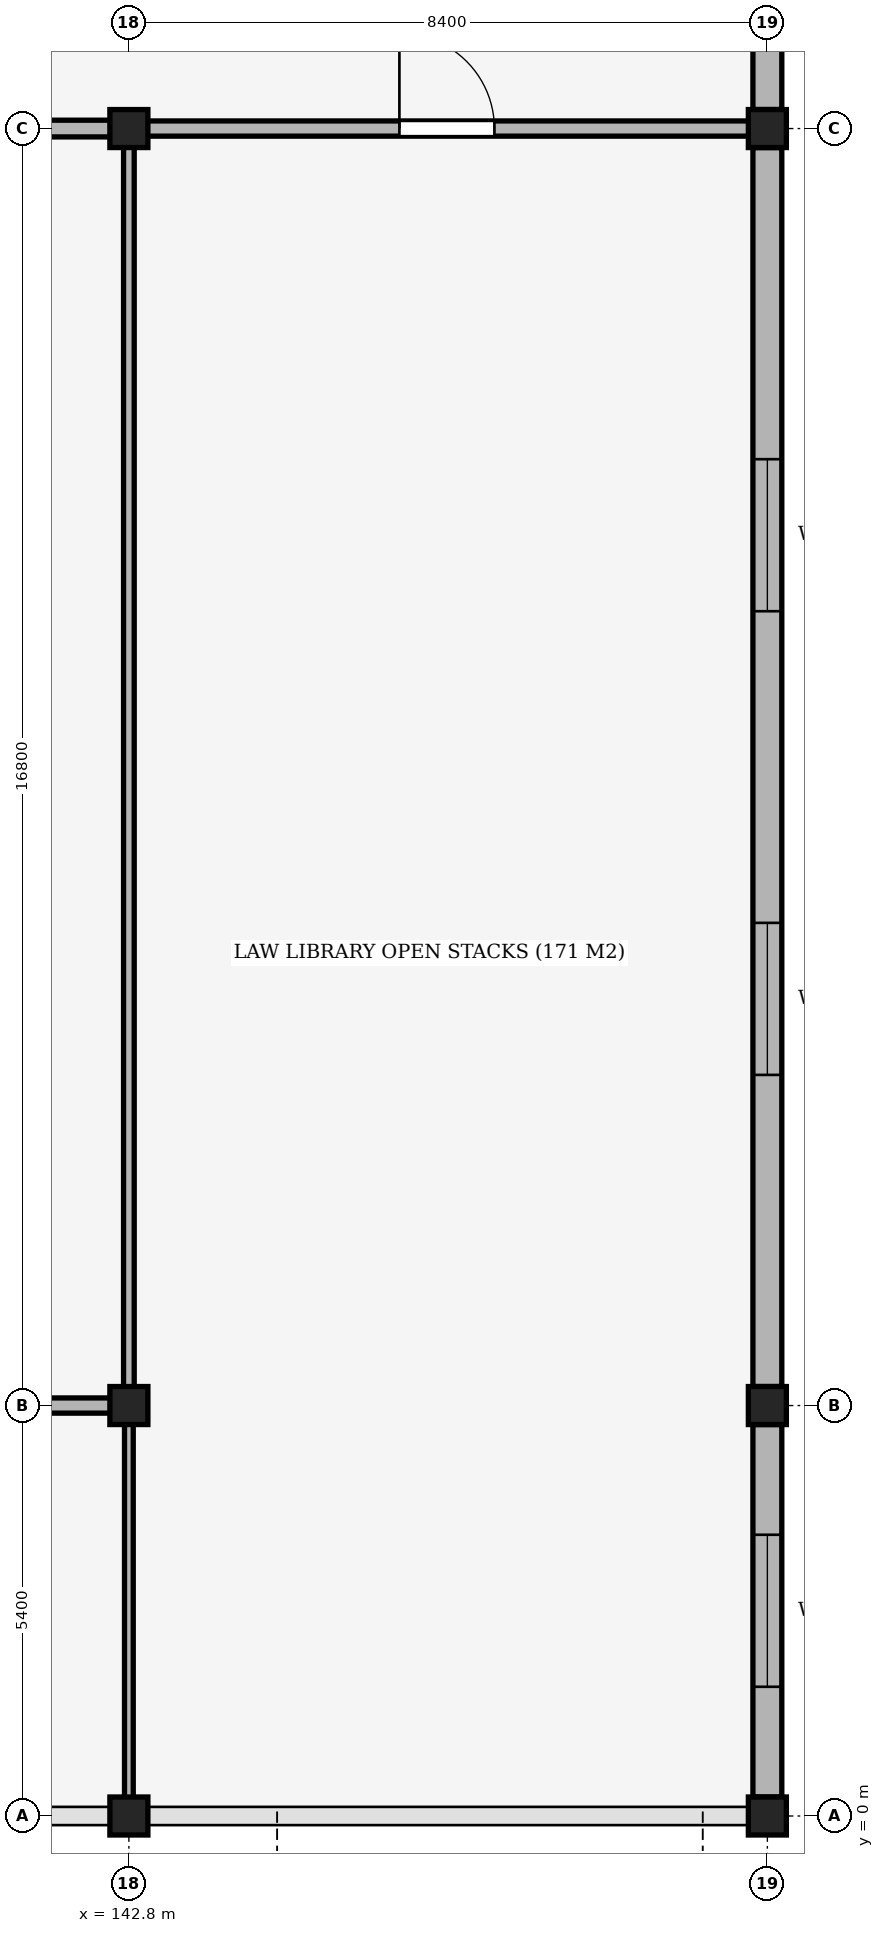
"""IFC4 building model, lengths in metres.
Left out: names, types, materials, properties, quantities, classifications, styles, units other than length and angle.
Written with IfcOpenShell. Run it as: python <this file> out.ifc"""

import sys

from ifc_helpers import new_model, si_unit, direction, frame, frame_2d, origin, origin_2d, place, context, subcontext, project, spatial, rectangle, extrude, element, fill, save


model = new_model("IFC4")
c1 = context("Model", 3, precision=1e-05, world=origin(), true_north=direction((0.0, 1.0)))
c2 = subcontext(c1, "Body", "Model", "MODEL_VIEW")
j1 = project(units=[si_unit("LENGTHUNIT", "METRE"), si_unit("PLANEANGLEUNIT", "RADIAN")], contexts=[c1])
p1 = place(None, origin())
s1 = spatial("IfcSite", under=j1, at=p1, CompositionType="ELEMENT")
p2 = place(p1, origin())
s2 = spatial("IfcBuilding", under=s1, at=p2, CompositionType="ELEMENT")
p3 = place(p2, frame((0.0, 0.0, 10.2)))
s3 = spatial("IfcBuildingStorey", under=s2, at=p3, CompositionType="ELEMENT", Elevation=10.2)
for number, where, z_axis, x_axis in (
    (1, (142.8, 0.0, 0.0), (0.0, 0.0, 1.0), (1.0, 0.0, 0.0)),
    (2, (142.8, 5.4, 0.0), (0.0, 0.0, 1.0), (1.0, 0.0, 0.0)),
    (3, (142.8, 22.2, 0.0), (0.0, 0.0, 1.0), (1.0, 0.0, 0.0)),
    (4, (151.2, 0.0, 0.0), (0.0, 0.0, 1.0), (1.0, 0.0, 0.0)),
    (5, (151.2, 5.4, 0.0), (0.0, 0.0, 1.0), (1.0, 0.0, 0.0)),
    (6, (151.2, 22.2, 0.0), (0.0, 0.0, 1.0), (1.0, 0.0, 0.0)),
):
    element("IfcColumn", number, at=place(p3, frame(where, z_axis=z_axis, x_axis=x_axis)), inside=s3, PredefinedType="COLUMN", context=c2, shape_type="SweptSolid", body=[
        extrude(rectangle(XDim=0.5, YDim=0.5, at=origin_2d()), origin(), (0.0, 0.0, 1.0), 5.1),
    ])
p4 = place(p3, frame((151.2, 26.75, 0.0), z_axis=(0.0, 0.0, 1.0), x_axis=(0.0, -1.0, 0.0)))
e7 = element("IfcWall", 7, at=p4, inside=s3, PredefinedType="SOLIDWALL", context=c2, shape_type="SweptSolid", body=[
    extrude(rectangle(XDim=4.3, YDim=0.38, at=frame_2d((2.15, 0.0))), origin(), (0.0, 0.0, 1.0), 3.77),
])
p5 = place(p3, frame((151.2, 21.95, 0.0), z_axis=(0.0, 0.0, 1.0), x_axis=(0.0, -1.0, 0.0)))
e8 = element("IfcWall", 8, at=p5, inside=s3, PredefinedType="SOLIDWALL", context=c2, shape_type="SweptSolid", body=[
    extrude(rectangle(XDim=16.3, YDim=0.38, at=frame_2d((8.15, 0.0))), origin(), (0.0, 0.0, 1.0), 3.77),
])
p6 = place(p5, frame((4.1, 0.0, 2.1)))
e9 = element("IfcOpeningElement", 9, at=p6, cuts=e8, PredefinedType="OPENING", context=c2, shape_type="SweptSolid", body=[
    extrude(rectangle(XDim=2.0, YDim=1.2, at=frame_2d((1.0, 0.6))), frame((0.0, 0.205, 0.0), z_axis=(0.0, -1.0, 0.0), x_axis=(1.0, 0.0, 0.0)), (0.0, 0.0, 1.0), 0.41),
])
p7 = place(p5, frame((10.2, 0.0, 2.1)))
e10 = element("IfcOpeningElement", 10, at=p7, cuts=e8, PredefinedType="OPENING", context=c2, shape_type="SweptSolid", body=[
    extrude(rectangle(XDim=2.0, YDim=1.2, at=frame_2d((1.0, 0.6))), frame((0.0, 0.205, 0.0), z_axis=(0.0, -1.0, 0.0), x_axis=(1.0, 0.0, 0.0)), (0.0, 0.0, 1.0), 0.41),
])
p8 = place(p3, frame((151.2, 5.15, 0.0), z_axis=(0.0, 0.0, 1.0), x_axis=(0.0, -1.0, 0.0)))
e11 = element("IfcWall", 11, at=p8, inside=s3, PredefinedType="SOLIDWALL", context=c2, shape_type="SweptSolid", body=[
    extrude(rectangle(XDim=4.9, YDim=0.38, at=frame_2d((2.45, 0.0))), origin(), (0.0, 0.0, 1.0), 3.77),
])
p9 = place(p8, frame((1.45, 0.0, 2.1)))
e12 = element("IfcOpeningElement", 12, at=p9, cuts=e11, PredefinedType="OPENING", context=c2, shape_type="SweptSolid", body=[
    extrude(rectangle(XDim=2.0, YDim=1.2, at=frame_2d((1.0, 0.6))), frame((0.0, 0.205, 0.0), z_axis=(0.0, -1.0, 0.0), x_axis=(1.0, 0.0, 0.0)), (0.0, 0.0, 1.0), 0.41),
])
p10 = place(p3, frame((117.6, 5.4, 0.0), z_axis=(0.0, 0.0, 1.0), x_axis=(1.0, 0.0, 0.0)))
e13 = element("IfcWall", 13, at=p10, inside=s3, PredefinedType="PARTITIONING", context=c2, shape_type="SweptSolid", body=[
    extrude(rectangle(XDim=25.2, YDim=0.2, at=frame_2d((12.6, 0.0))), origin(), (0.0, 0.0, 1.0), 3.77),
])
p11 = place(p10, frame((12.075, 0.0, 0.0)))
e14 = element("IfcOpeningElement", 14, at=p11, cuts=e13, PredefinedType="OPENING", context=c2, shape_type="SweptSolid", body=[
    extrude(rectangle(XDim=1.05, YDim=2.1, at=frame_2d((0.525, 1.05))), frame((0.0, 0.115, 0.0), z_axis=(0.0, -1.0, 0.0), x_axis=(1.0, 0.0, 0.0)), (0.0, 0.0, 1.0), 0.23),
])
p12 = place(p3, frame((117.6, 22.2, 0.0), z_axis=(0.0, 0.0, 1.0), x_axis=(1.0, 0.0, 0.0)))
e15 = element("IfcWall", 15, at=p12, inside=s3, PredefinedType="PARTITIONING", context=c2, shape_type="SweptSolid", body=[
    extrude(rectangle(XDim=25.2, YDim=0.22, at=frame_2d((12.6, 0.0))), origin(), (0.0, 0.0, 1.0), 3.77),
])
p13 = place(p12, frame((12.15, 0.0, 0.0)))
e16 = element("IfcOpeningElement", 16, at=p13, cuts=e15, PredefinedType="OPENING", context=c2, shape_type="SweptSolid", body=[
    extrude(rectangle(XDim=0.9, YDim=2.1, at=frame_2d((0.45, 1.05))), frame((0.0, 0.125, 0.0), z_axis=(0.0, -1.0, 0.0), x_axis=(1.0, 0.0, 0.0)), (0.0, 0.0, 1.0), 0.25),
])
p14 = place(p3, frame((142.8, 22.2, 0.0), z_axis=(0.0, 0.0, 1.0), x_axis=(1.0, 0.0, 0.0)))
e17 = element("IfcWall", 17, at=p14, inside=s3, PredefinedType="PARTITIONING", context=c2, shape_type="SweptSolid", body=[
    extrude(rectangle(XDim=8.369, YDim=0.2, at=frame_2d((4.185, 0.0))), origin(), (0.0, 0.0, 1.0), 3.77),
])
p15 = place(p14, frame((3.559, 0.0, 0.0)))
e18 = element("IfcOpeningElement", 18, at=p15, cuts=e17, PredefinedType="OPENING", context=c2, shape_type="SweptSolid", body=[
    extrude(rectangle(XDim=1.25, YDim=2.2, at=frame_2d((0.625, 1.1))), frame((0.0, 0.115, 0.0), z_axis=(0.0, -1.0, 0.0), x_axis=(1.0, 0.0, 0.0)), (0.0, 0.0, 1.0), 0.23),
])
p16 = place(p3, frame((142.8, 5.502, 0.0), z_axis=(0.0, 0.0, 1.0), x_axis=(0.0, 1.0, 0.0)))
e19 = element("IfcWall", 19, at=p16, inside=s3, PredefinedType="PARTITIONING", context=c2, shape_type="SweptSolid", body=[
    extrude(rectangle(XDim=16.586, YDim=0.14, at=frame_2d((8.293, 0.0))), origin(), (0.0, 0.0, 1.0), 3.77),
])
p17 = place(p3, frame((142.8, 0.056, 0.0), z_axis=(0.0, 0.0, 1.0), x_axis=(0.0, 1.0, 0.0)))
e20 = element("IfcWall", 20, at=p17, inside=s3, PredefinedType="PARTITIONING", context=c2, shape_type="SweptSolid", body=[
    extrude(rectangle(XDim=5.242, YDim=0.115, at=frame_2d((2.621, 0.0))), origin(), (0.0, 0.0, 1.0), 3.77),
])
p18 = place(p6, origin())
e21 = element("IfcWindow", 21, at=p18, inside=s3, PartitioningType="SINGLE_PANEL", PredefinedType="WINDOW", context=c2, shape_type="SweptSolid", body=[
    extrude(rectangle(XDim=2.0, YDim=1.2, at=frame_2d((1.0, 0.6))), frame((0.0, 0.03, 0.0), z_axis=(0.0, -1.0, 0.0), x_axis=(1.0, 0.0, 0.0)), (0.0, 0.0, 1.0), 0.06),
])
fill(e9, e21)
p19 = place(p7, origin())
e22 = element("IfcWindow", 22, at=p19, inside=s3, PartitioningType="SINGLE_PANEL", PredefinedType="WINDOW", context=c2, shape_type="SweptSolid", body=[
    extrude(rectangle(XDim=2.0, YDim=1.2, at=frame_2d((1.0, 0.6))), frame((0.0, 0.03, 0.0), z_axis=(0.0, -1.0, 0.0), x_axis=(1.0, 0.0, 0.0)), (0.0, 0.0, 1.0), 0.06),
])
fill(e10, e22)
p20 = place(p9, origin())
e23 = element("IfcWindow", 23, at=p20, inside=s3, PartitioningType="SINGLE_PANEL", PredefinedType="WINDOW", context=c2, shape_type="SweptSolid", body=[
    extrude(rectangle(XDim=2.0, YDim=1.2, at=frame_2d((1.0, 0.6))), frame((0.0, 0.03, 0.0), z_axis=(0.0, -1.0, 0.0), x_axis=(1.0, 0.0, 0.0)), (0.0, 0.0, 1.0), 0.06),
])
fill(e12, e23)
p21 = place(p15, origin())
e24 = element("IfcDoor", 24, at=p21, inside=s3, OperationType="SINGLE_SWING_LEFT", PredefinedType="DOOR", context=c2, shape_type="SweptSolid", body=[
    extrude(rectangle(XDim=1.25, YDim=2.2, at=frame_2d((0.625, 1.1))), frame((0.0, 0.025, 0.0), z_axis=(0.0, -1.0, 0.0), x_axis=(1.0, 0.0, 0.0)), (0.0, 0.0, 1.0), 0.05),
])
fill(e18, e24)
save(model, sys.argv[1])
